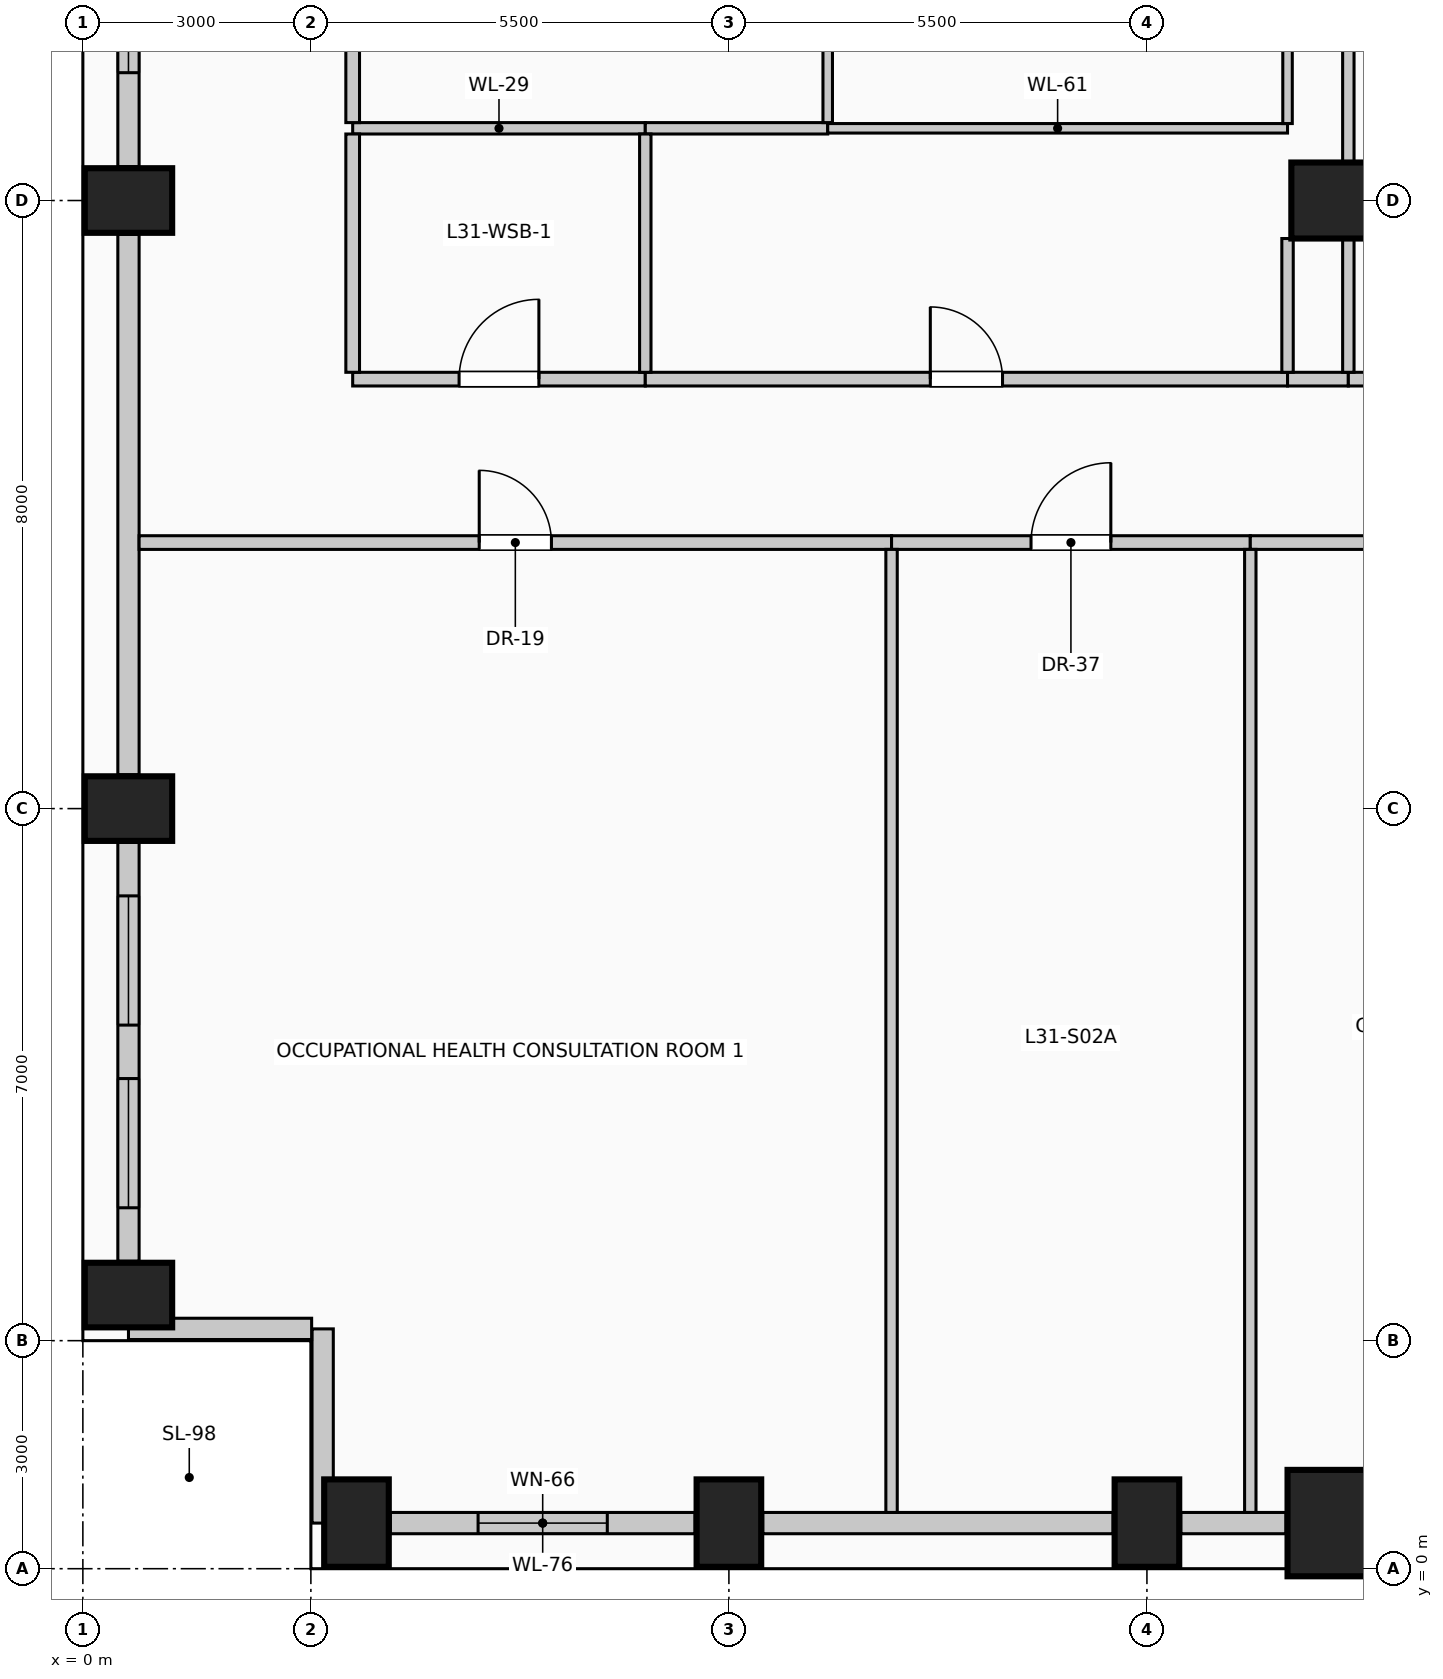
"""IFC4 building model, lengths in metres.
Left out: names, types, materials, properties, quantities, classifications, styles, units other than length and angle.
Written with IfcOpenShell. Run it as: python <this file> out.ifc"""

import sys

from ifc_helpers import new_model, si_unit, direction, frame, frame_2d, origin, origin_2d, place, context, subcontext, project, spatial, rectangle, circle, extrude, element, fill, save


model = new_model("IFC4")
c1 = context("Model", 3, precision=1e-05, world=origin(), true_north=direction((0.0, 1.0)))
c2 = subcontext(c1, "Body", "Model", "MODEL_VIEW")
j1 = project(units=[si_unit("LENGTHUNIT", "METRE"), si_unit("PLANEANGLEUNIT", "RADIAN")], contexts=[c1])
p1 = place(None, origin())
s1 = spatial("IfcSite", under=j1, at=p1, CompositionType="ELEMENT")
p2 = place(p1, origin())
s2 = spatial("IfcBuilding", under=s1, at=p2, CompositionType="ELEMENT")
p3 = place(p2, frame((0.0, 0.0, 128.6)))
s3 = spatial("IfcBuildingStorey", under=s2, at=p3, CompositionType="ELEMENT", Elevation=128.6)
for number, where, z_axis, x_axis in (
    (1, (3.6, 0.6, 0.0), (0.0, 0.0, 1.0), (1.0, 0.0, 0.0)),
    (2, (8.5, 0.6, 0.0), (0.0, 0.0, 1.0), (1.0, 0.0, 0.0)),
    (3, (14.0, 0.6, 0.0), (0.0, 0.0, 1.0), (1.0, 0.0, 0.0)),
):
    element("IfcColumn", number, at=place(p3, frame(where, z_axis=z_axis, x_axis=x_axis)), inside=s3, PredefinedType="COLUMN", context=c2, shape_type="SweptSolid", body=[
        extrude(rectangle(XDim=0.85, YDim=1.15, at=origin_2d()), origin(), (0.0, 0.0, 1.0), 4.0),
    ])
p4 = place(p3, frame((16.4, 0.6, 0.0), z_axis=(0.0, 0.0, 1.0), x_axis=(1.0, 0.0, 0.0)))
e4 = element("IfcColumn", 4, at=p4, inside=s3, PredefinedType="COLUMN", context=c2, shape_type="SweptSolid", body=[
    extrude(rectangle(XDim=1.1, YDim=1.4, at=origin_2d()), origin(), (0.0, 0.0, 1.0), 4.0),
])
for number, where, z_axis, x_axis in (
    (5, (0.6, 3.6, 0.0), (0.0, 0.0, 1.0), (0.0, 1.0, 0.0)),
    (6, (0.6, 10.0, 0.0), (0.0, 0.0, 1.0), (0.0, 1.0, 0.0)),
    (7, (0.6, 18.0, 0.0), (0.0, 0.0, 1.0), (0.0, 1.0, 0.0)),
):
    element("IfcColumn", number, at=place(p3, frame(where, z_axis=z_axis, x_axis=x_axis)), inside=s3, PredefinedType="COLUMN", context=c2, shape_type="SweptSolid", body=[
        extrude(rectangle(XDim=0.85, YDim=1.15, at=origin_2d()), origin(), (0.0, 0.0, 1.0), 4.0),
    ])
p5 = place(p3, frame((16.4, 18.0, 0.0), z_axis=(0.0, 0.0, 1.0), x_axis=(1.0, 0.0, 0.0)))
e8 = element("IfcColumn", 8, at=p5, inside=s3, PredefinedType="COLUMN", context=c2, shape_type="SweptSolid", body=[
    extrude(circle(Radius=0.5, at=origin_2d()), origin(), (0.0, 0.0, 1.0), 4.0),
])
p6 = place(p3, frame((8.055, 0.6, 0.0), z_axis=(0.0, 0.0, 1.0), x_axis=(-1.0, 0.0, 0.0)))
e9 = element("IfcWall", 9, at=p6, inside=s3, PredefinedType="SOLIDWALL", context=c2, shape_type="SweptSolid", body=[
    extrude(rectangle(XDim=4.01, YDim=0.28, at=frame_2d((2.005, 0.0))), origin(), (0.0, 0.0, 1.0), 2.875),
])
p7 = place(p6, frame((1.155, 0.0, 0.5)))
e10 = element("IfcOpeningElement", 10, at=p7, cuts=e9, PredefinedType="OPENING", context=c2, shape_type="SweptSolid", body=[
    extrude(rectangle(XDim=1.7, YDim=1.95, at=frame_2d((0.85, 0.975))), frame((0.0, 0.15, 0.0), z_axis=(0.0, -1.0, 0.0), x_axis=(1.0, 0.0, 0.0)), (0.0, 0.0, 1.0), 0.3),
])
p8 = place(p3, frame((13.555, 0.6, 0.0), z_axis=(0.0, 0.0, 1.0), x_axis=(-1.0, 0.0, 0.0)))
e11 = element("IfcWall", 11, at=p8, inside=s3, PredefinedType="SOLIDWALL", context=c2, shape_type="SweptSolid", body=[
    extrude(rectangle(XDim=4.61, YDim=0.28, at=frame_2d((2.305, 0.0))), origin(), (0.0, 0.0, 1.0), 2.875),
])
p9 = place(p3, frame((15.83, 0.6, 0.0), z_axis=(0.0, 0.0, 1.0), x_axis=(-1.0, 0.0, 0.0)))
e12 = element("IfcWall", 12, at=p9, inside=s3, PredefinedType="SOLIDWALL", context=c2, shape_type="SweptSolid", body=[
    extrude(rectangle(XDim=1.385, YDim=0.28, at=frame_2d((0.692, 0.0))), origin(), (0.0, 0.0, 1.0), 2.875),
])
p10 = place(p3, frame((0.6, 4.045, 0.0), z_axis=(0.0, 0.0, 1.0), x_axis=(0.0, 1.0, 0.0)))
e13 = element("IfcWall", 13, at=p10, inside=s3, PredefinedType="SOLIDWALL", context=c2, shape_type="SweptSolid", body=[
    extrude(rectangle(XDim=5.51, YDim=0.28, at=frame_2d((2.755, 0.0))), origin(), (0.0, 0.0, 1.0), 2.875),
])
p11 = place(p10, frame((0.703, 0.0, 0.5)))
e14 = element("IfcOpeningElement", 14, at=p11, cuts=e13, PredefinedType="OPENING", context=c2, shape_type="SweptSolid", body=[
    extrude(rectangle(XDim=1.7, YDim=1.95, at=frame_2d((0.85, 0.975))), frame((0.0, 0.15, 0.0), z_axis=(0.0, -1.0, 0.0), x_axis=(1.0, 0.0, 0.0)), (0.0, 0.0, 1.0), 0.3),
])
p12 = place(p10, frame((3.107, 0.0, 0.5)))
e15 = element("IfcOpeningElement", 15, at=p12, cuts=e13, PredefinedType="OPENING", context=c2, shape_type="SweptSolid", body=[
    extrude(rectangle(XDim=1.7, YDim=1.95, at=frame_2d((0.85, 0.975))), frame((0.0, 0.15, 0.0), z_axis=(0.0, -1.0, 0.0), x_axis=(1.0, 0.0, 0.0)), (0.0, 0.0, 1.0), 0.3),
])
p13 = place(p3, frame((0.6, 10.445, 0.0), z_axis=(0.0, 0.0, 1.0), x_axis=(0.0, 1.0, 0.0)))
e16 = element("IfcWall", 16, at=p13, inside=s3, PredefinedType="SOLIDWALL", context=c2, shape_type="SweptSolid", body=[
    extrude(rectangle(XDim=7.11, YDim=0.28, at=frame_2d((3.555, 0.0))), origin(), (0.0, 0.0, 1.0), 2.875),
])
p14 = place(p3, frame((0.6, 18.445, 0.0), z_axis=(0.0, 0.0, 1.0), x_axis=(0.0, 1.0, 0.0)))
e17 = element("IfcWall", 17, at=p14, inside=s3, PredefinedType="SOLIDWALL", context=c2, shape_type="SweptSolid", body=[
    extrude(rectangle(XDim=7.11, YDim=0.28, at=frame_2d((3.555, 0.0))), origin(), (0.0, 0.0, 1.0), 2.875),
])
p15 = place(p14, frame((1.237, 0.0, 0.5)))
e18 = element("IfcOpeningElement", 18, at=p15, cuts=e17, PredefinedType="OPENING", context=c2, shape_type="SweptSolid", body=[
    extrude(rectangle(XDim=1.7, YDim=1.95, at=frame_2d((0.85, 0.975))), frame((0.0, 0.15, 0.0), z_axis=(0.0, -1.0, 0.0), x_axis=(1.0, 0.0, 0.0)), (0.0, 0.0, 1.0), 0.3),
])
p16 = place(p3, frame((3.155, 0.6, 0.0), z_axis=(0.0, 0.0, 1.0), x_axis=(0.0, 1.0, 0.0)))
e19 = element("IfcWall", 19, at=p16, inside=s3, PredefinedType="SOLIDWALL", context=c2, shape_type="SweptSolid", body=[
    extrude(rectangle(XDim=2.555, YDim=0.28, at=frame_2d((1.277, 0.0))), origin(), (0.0, 0.0, 1.0), 3.725),
])
p17 = place(p3, frame((3.01, 3.155, 0.0), z_axis=(0.0, 0.0, 1.0), x_axis=(-1.0, 0.0, 0.0)))
e20 = element("IfcWall", 20, at=p17, inside=s3, PredefinedType="SOLIDWALL", context=c2, shape_type="SweptSolid", body=[
    extrude(rectangle(XDim=2.41, YDim=0.28, at=frame_2d((1.205, 0.0))), origin(), (0.0, 0.0, 1.0), 3.725),
])
p18 = place(p3, frame((0.74, 13.5, 0.0), z_axis=(0.0, 0.0, 1.0), x_axis=(1.0, 0.0, 0.0)))
e21 = element("IfcWall", 21, at=p18, inside=s3, PredefinedType="PARTITIONING", context=c2, shape_type="SweptSolid", body=[
    extrude(rectangle(XDim=9.9, YDim=0.18, at=frame_2d((4.95, 0.0))), origin(), (0.0, 0.0, 1.0), 3.725),
])
p19 = place(p18, frame((4.475, 0.0, 0.0)))
e22 = element("IfcOpeningElement", 22, at=p19, cuts=e21, PredefinedType="OPENING", context=c2, shape_type="SweptSolid", body=[
    extrude(rectangle(XDim=0.95, YDim=2.15, at=frame_2d((0.475, 1.075))), frame((0.0, 0.1, 0.0), z_axis=(0.0, -1.0, 0.0), x_axis=(1.0, 0.0, 0.0)), (0.0, 0.0, 1.0), 0.2),
])
p20 = place(p3, frame((10.64, 13.5, 0.0), z_axis=(0.0, 0.0, 1.0), x_axis=(1.0, 0.0, 0.0)))
e23 = element("IfcWall", 23, at=p20, inside=s3, PredefinedType="PARTITIONING", context=c2, shape_type="SweptSolid", body=[
    extrude(rectangle(XDim=4.72, YDim=0.18, at=frame_2d((2.36, 0.0))), origin(), (0.0, 0.0, 1.0), 3.725),
])
p21 = place(p20, frame((1.835, 0.0, 0.0)))
e24 = element("IfcOpeningElement", 24, at=p21, cuts=e23, PredefinedType="OPENING", context=c2, shape_type="SweptSolid", body=[
    extrude(rectangle(XDim=1.05, YDim=2.15, at=frame_2d((0.525, 1.075))), frame((0.0, 0.1, 0.0), z_axis=(0.0, -1.0, 0.0), x_axis=(1.0, 0.0, 0.0)), (0.0, 0.0, 1.0), 0.2),
])
p22 = place(p3, frame((15.36, 13.5, 0.0), z_axis=(0.0, 0.0, 1.0), x_axis=(1.0, 0.0, 0.0)))
e25 = element("IfcWall", 25, at=p22, inside=s3, PredefinedType="PARTITIONING", context=c2, shape_type="SweptSolid", body=[
    extrude(rectangle(XDim=7.08, YDim=0.18, at=frame_2d((3.54, 0.0))), origin(), (0.0, 0.0, 1.0), 3.725),
])
p23 = place(p22, frame((3.065, 0.0, 0.0)))
e26 = element("IfcOpeningElement", 26, at=p23, cuts=e25, PredefinedType="OPENING", context=c2, shape_type="SweptSolid", body=[
    extrude(rectangle(XDim=0.95, YDim=2.15, at=frame_2d((0.475, 1.075))), frame((0.0, 0.1, 0.0), z_axis=(0.0, -1.0, 0.0), x_axis=(1.0, 0.0, 0.0)), (0.0, 0.0, 1.0), 0.2),
])
p24 = place(p3, frame((3.55, 15.65, 0.0), z_axis=(0.0, 0.0, 1.0), x_axis=(1.0, 0.0, 0.0)))
e27 = element("IfcWall", 27, at=p24, inside=s3, PredefinedType="PARTITIONING", context=c2, shape_type="SweptSolid", body=[
    extrude(rectangle(XDim=3.85, YDim=0.18, at=frame_2d((1.925, 0.0))), origin(), (0.0, 0.0, 1.0), 3.725),
])
p25 = place(p24, frame((1.4, 0.0, 0.0)))
e28 = element("IfcOpeningElement", 28, at=p25, cuts=e27, PredefinedType="OPENING", context=c2, shape_type="SweptSolid", body=[
    extrude(rectangle(XDim=1.05, YDim=2.15, at=frame_2d((0.525, 1.075))), frame((0.0, 0.1, 0.0), z_axis=(0.0, -1.0, 0.0), x_axis=(1.0, 0.0, 0.0)), (0.0, 0.0, 1.0), 0.2),
])
p26 = place(p3, frame((7.4, 15.65, 0.0), z_axis=(0.0, 0.0, 1.0), x_axis=(1.0, 0.0, 0.0)))
e29 = element("IfcWall", 29, at=p26, inside=s3, PredefinedType="PARTITIONING", context=c2, shape_type="SweptSolid", body=[
    extrude(rectangle(XDim=8.45, YDim=0.18, at=frame_2d((4.225, 0.0))), origin(), (0.0, 0.0, 1.0), 3.725),
])
p27 = place(p26, frame((3.75, 0.0, 0.0)))
e30 = element("IfcOpeningElement", 30, at=p27, cuts=e29, PredefinedType="OPENING", context=c2, shape_type="SweptSolid", body=[
    extrude(rectangle(XDim=0.95, YDim=2.15, at=frame_2d((0.475, 1.075))), frame((0.0, 0.1, 0.0), z_axis=(0.0, -1.0, 0.0), x_axis=(1.0, 0.0, 0.0)), (0.0, 0.0, 1.0), 0.2),
])
p28 = place(p3, frame((15.85, 15.65, 0.0), z_axis=(0.0, 0.0, 1.0), x_axis=(1.0, 0.0, 0.0)))
e31 = element("IfcWall", 31, at=p28, inside=s3, PredefinedType="PARTITIONING", context=c2, shape_type="SweptSolid", body=[
    extrude(rectangle(XDim=0.8, YDim=0.18, at=frame_2d((0.4, 0.0))), origin(), (0.0, 0.0, 1.0), 3.725),
])
p29 = place(p3, frame((16.65, 15.65, 0.0), z_axis=(0.0, 0.0, 1.0), x_axis=(1.0, 0.0, 0.0)))
e32 = element("IfcWall", 32, at=p29, inside=s3, PredefinedType="PARTITIONING", context=c2, shape_type="SweptSolid", body=[
    extrude(rectangle(XDim=21.35, YDim=0.18, at=frame_2d((10.675, 0.0))), origin(), (0.0, 0.0, 1.0), 3.725),
])
p30 = place(p29, frame((10.2, 0.0, 0.0)))
e33 = element("IfcOpeningElement", 33, at=p30, cuts=e32, PredefinedType="OPENING", context=c2, shape_type="SweptSolid", body=[
    extrude(rectangle(XDim=0.95, YDim=2.15, at=frame_2d((0.475, 1.075))), frame((0.0, 0.1, 0.0), z_axis=(0.0, -1.0, 0.0), x_axis=(1.0, 0.0, 0.0)), (0.0, 0.0, 1.0), 0.2),
])
p31 = place(p3, frame((3.55, 18.95, 0.0), z_axis=(0.0, 0.0, 1.0), x_axis=(1.0, 0.0, 0.0)))
e34 = element("IfcWall", 34, at=p31, inside=s3, PredefinedType="PARTITIONING", context=c2, shape_type="SweptSolid", body=[
    extrude(rectangle(XDim=3.85, YDim=0.15, at=frame_2d((1.925, 0.0))), origin(), (0.0, 0.0, 1.0), 3.725),
])
p32 = place(p3, frame((7.4, 18.95, 0.0), z_axis=(0.0, 0.0, 1.0), x_axis=(1.0, 0.0, 0.0)))
e35 = element("IfcWall", 35, at=p32, inside=s3, PredefinedType="PARTITIONING", context=c2, shape_type="SweptSolid", body=[
    extrude(rectangle(XDim=2.4, YDim=0.15, at=frame_2d((1.2, 0.0))), origin(), (0.0, 0.0, 1.0), 3.725),
])
p33 = place(p3, frame((9.8, 18.95, 0.0), z_axis=(0.0, 0.0, 1.0), x_axis=(1.0, 0.0, 0.0)))
e36 = element("IfcWall", 36, at=p33, inside=s3, PredefinedType="PARTITIONING", context=c2, shape_type="SweptSolid", body=[
    extrude(rectangle(XDim=6.05, YDim=0.125, at=frame_2d((3.025, 0.0))), origin(), (0.0, 0.0, 1.0), 3.725),
])
p34 = place(p3, frame((3.55, 15.74, 0.0), z_axis=(0.0, 0.0, 1.0), x_axis=(0.0, 1.0, 0.0)))
e37 = element("IfcWall", 37, at=p34, inside=s3, PredefinedType="PARTITIONING", context=c2, shape_type="SweptSolid", body=[
    extrude(rectangle(XDim=3.135, YDim=0.18, at=frame_2d((1.567, 0.0))), origin(), (0.0, 0.0, 1.0), 3.725),
])
p35 = place(p3, frame((3.55, 19.025, 0.0), z_axis=(0.0, 0.0, 1.0), x_axis=(0.0, 1.0, 0.0)))
e38 = element("IfcWall", 38, at=p35, inside=s3, PredefinedType="PARTITIONING", context=c2, shape_type="SweptSolid", body=[
    extrude(rectangle(XDim=5.7, YDim=0.18, at=frame_2d((2.85, 0.0))), origin(), (0.0, 0.0, 1.0), 3.725),
])
p36 = place(p3, frame((7.4, 15.74, 0.0), z_axis=(0.0, 0.0, 1.0), x_axis=(0.0, 1.0, 0.0)))
e39 = element("IfcWall", 39, at=p36, inside=s3, PredefinedType="PARTITIONING", context=c2, shape_type="SweptSolid", body=[
    extrude(rectangle(XDim=3.135, YDim=0.15, at=frame_2d((1.567, 0.0))), origin(), (0.0, 0.0, 1.0), 3.725),
])
p37 = place(p3, frame((9.8, 19.025, 0.0), z_axis=(0.0, 0.0, 1.0), x_axis=(0.0, 1.0, 0.0)))
e40 = element("IfcWall", 40, at=p37, inside=s3, PredefinedType="PARTITIONING", context=c2, shape_type="SweptSolid", body=[
    extrude(rectangle(XDim=5.7, YDim=0.125, at=frame_2d((2.85, 0.0))), origin(), (0.0, 0.0, 1.0), 3.725),
])
for number, where, z_axis, x_axis in (
    (41, (10.64, 0.74, 0.0), (0.0, 0.0, 1.0), (0.0, 1.0, 0.0)),
    (42, (15.36, 0.74, 0.0), (0.0, 0.0, 1.0), (0.0, 1.0, 0.0)),
):
    element("IfcWall", number, at=place(p3, frame(where, z_axis=z_axis, x_axis=x_axis)), inside=s3, PredefinedType="PARTITIONING", context=c2, shape_type="SweptSolid", body=[
        extrude(rectangle(XDim=12.67, YDim=0.15, at=frame_2d((6.335, 0.0))), origin(), (0.0, 0.0, 1.0), 3.725),
    ])
p38 = place(p3, frame((15.85, 15.74, 0.0), z_axis=(0.0, 0.0, 1.0), x_axis=(0.0, 1.0, 0.0)))
e43 = element("IfcWall", 43, at=p38, inside=s3, PredefinedType="PARTITIONING", context=c2, shape_type="SweptSolid", body=[
    extrude(rectangle(XDim=1.76, YDim=0.15, at=frame_2d((0.88, 0.0))), origin(), (0.0, 0.0, 1.0), 3.725),
])
p39 = place(p3, frame((15.85, 19.012, 0.0), z_axis=(0.0, 0.0, 1.0), x_axis=(0.0, 1.0, 0.0)))
e44 = element("IfcWall", 44, at=p39, inside=s3, PredefinedType="PARTITIONING", context=c2, shape_type="SweptSolid", body=[
    extrude(rectangle(XDim=5.725, YDim=0.125, at=frame_2d((2.863, 0.0))), origin(), (0.0, 0.0, 1.0), 3.725),
])
p40 = place(p3, frame((16.65, 15.74, 0.0), z_axis=(0.0, 0.0, 1.0), x_axis=(0.0, 1.0, 0.0)))
e45 = element("IfcWall", 45, at=p40, inside=s3, PredefinedType="PARTITIONING", context=c2, shape_type="SweptSolid", body=[
    extrude(rectangle(XDim=1.76, YDim=0.15, at=frame_2d((0.88, 0.0))), origin(), (0.0, 0.0, 1.0), 3.07),
])
p41 = place(p3, frame((16.65, 18.5, 0.0), z_axis=(0.0, 0.0, 1.0), x_axis=(0.0, 1.0, 0.0)))
e46 = element("IfcWall", 46, at=p41, inside=s3, PredefinedType="PARTITIONING", context=c2, shape_type="SweptSolid", body=[
    extrude(rectangle(XDim=8.025, YDim=0.15, at=frame_2d((4.012, 0.0))), origin(), (0.0, 0.0, 1.0), 3.07),
])
p42 = place(p7, origin())
e47 = element("IfcWindow", 47, at=p42, inside=s3, PartitioningType="SINGLE_PANEL", PredefinedType="WINDOW", context=c2, shape_type="SweptSolid", body=[
    extrude(rectangle(XDim=1.7, YDim=1.95, at=frame_2d((0.85, 0.975))), frame((0.0, 0.03, 0.0), z_axis=(0.0, -1.0, 0.0), x_axis=(1.0, 0.0, 0.0)), (0.0, 0.0, 1.0), 0.06),
])
fill(e10, e47)
p43 = place(p11, origin())
e48 = element("IfcWindow", 48, at=p43, inside=s3, PartitioningType="SINGLE_PANEL", PredefinedType="WINDOW", context=c2, shape_type="SweptSolid", body=[
    extrude(rectangle(XDim=1.7, YDim=1.95, at=frame_2d((0.85, 0.975))), frame((0.0, 0.03, 0.0), z_axis=(0.0, -1.0, 0.0), x_axis=(1.0, 0.0, 0.0)), (0.0, 0.0, 1.0), 0.06),
])
fill(e14, e48)
p44 = place(p12, origin())
e49 = element("IfcWindow", 49, at=p44, inside=s3, PartitioningType="SINGLE_PANEL", PredefinedType="WINDOW", context=c2, shape_type="SweptSolid", body=[
    extrude(rectangle(XDim=1.7, YDim=1.95, at=frame_2d((0.85, 0.975))), frame((0.0, 0.03, 0.0), z_axis=(0.0, -1.0, 0.0), x_axis=(1.0, 0.0, 0.0)), (0.0, 0.0, 1.0), 0.06),
])
fill(e15, e49)
p45 = place(p15, origin())
e50 = element("IfcWindow", 50, at=p45, inside=s3, PartitioningType="SINGLE_PANEL", PredefinedType="WINDOW", context=c2, shape_type="SweptSolid", body=[
    extrude(rectangle(XDim=1.7, YDim=1.95, at=frame_2d((0.85, 0.975))), frame((0.0, 0.03, 0.0), z_axis=(0.0, -1.0, 0.0), x_axis=(1.0, 0.0, 0.0)), (0.0, 0.0, 1.0), 0.06),
])
fill(e18, e50)
p46 = place(p19, origin())
e51 = element("IfcDoor", 51, at=p46, inside=s3, OperationType="SINGLE_SWING_LEFT", PredefinedType="DOOR", context=c2, shape_type="SweptSolid", body=[
    extrude(rectangle(XDim=0.95, YDim=2.15, at=frame_2d((0.475, 1.075))), frame((0.0, 0.025, 0.0), z_axis=(0.0, -1.0, 0.0), x_axis=(1.0, 0.0, 0.0)), (0.0, 0.0, 1.0), 0.05),
])
fill(e22, e51)
p47 = place(p21, origin())
e52 = element("IfcDoor", 52, at=p47, inside=s3, OperationType="SINGLE_SWING_RIGHT", PredefinedType="DOOR", context=c2, shape_type="SweptSolid", body=[
    extrude(rectangle(XDim=1.05, YDim=2.15, at=frame_2d((0.525, 1.075))), frame((0.0, 0.025, 0.0), z_axis=(0.0, -1.0, 0.0), x_axis=(1.0, 0.0, 0.0)), (0.0, 0.0, 1.0), 0.05),
])
fill(e24, e52)
p48 = place(p25, origin())
e53 = element("IfcDoor", 53, at=p48, inside=s3, OperationType="SINGLE_SWING_RIGHT", PredefinedType="DOOR", context=c2, shape_type="SweptSolid", body=[
    extrude(rectangle(XDim=1.05, YDim=2.15, at=frame_2d((0.525, 1.075))), frame((0.0, 0.025, 0.0), z_axis=(0.0, -1.0, 0.0), x_axis=(1.0, 0.0, 0.0)), (0.0, 0.0, 1.0), 0.05),
])
fill(e28, e53)
p49 = place(p27, origin())
e54 = element("IfcDoor", 54, at=p49, inside=s3, OperationType="SINGLE_SWING_LEFT", PredefinedType="DOOR", context=c2, shape_type="SweptSolid", body=[
    extrude(rectangle(XDim=0.95, YDim=2.15, at=frame_2d((0.475, 1.075))), frame((0.0, 0.025, 0.0), z_axis=(0.0, -1.0, 0.0), x_axis=(1.0, 0.0, 0.0)), (0.0, 0.0, 1.0), 0.05),
])
fill(e30, e54)
save(model, sys.argv[1])
